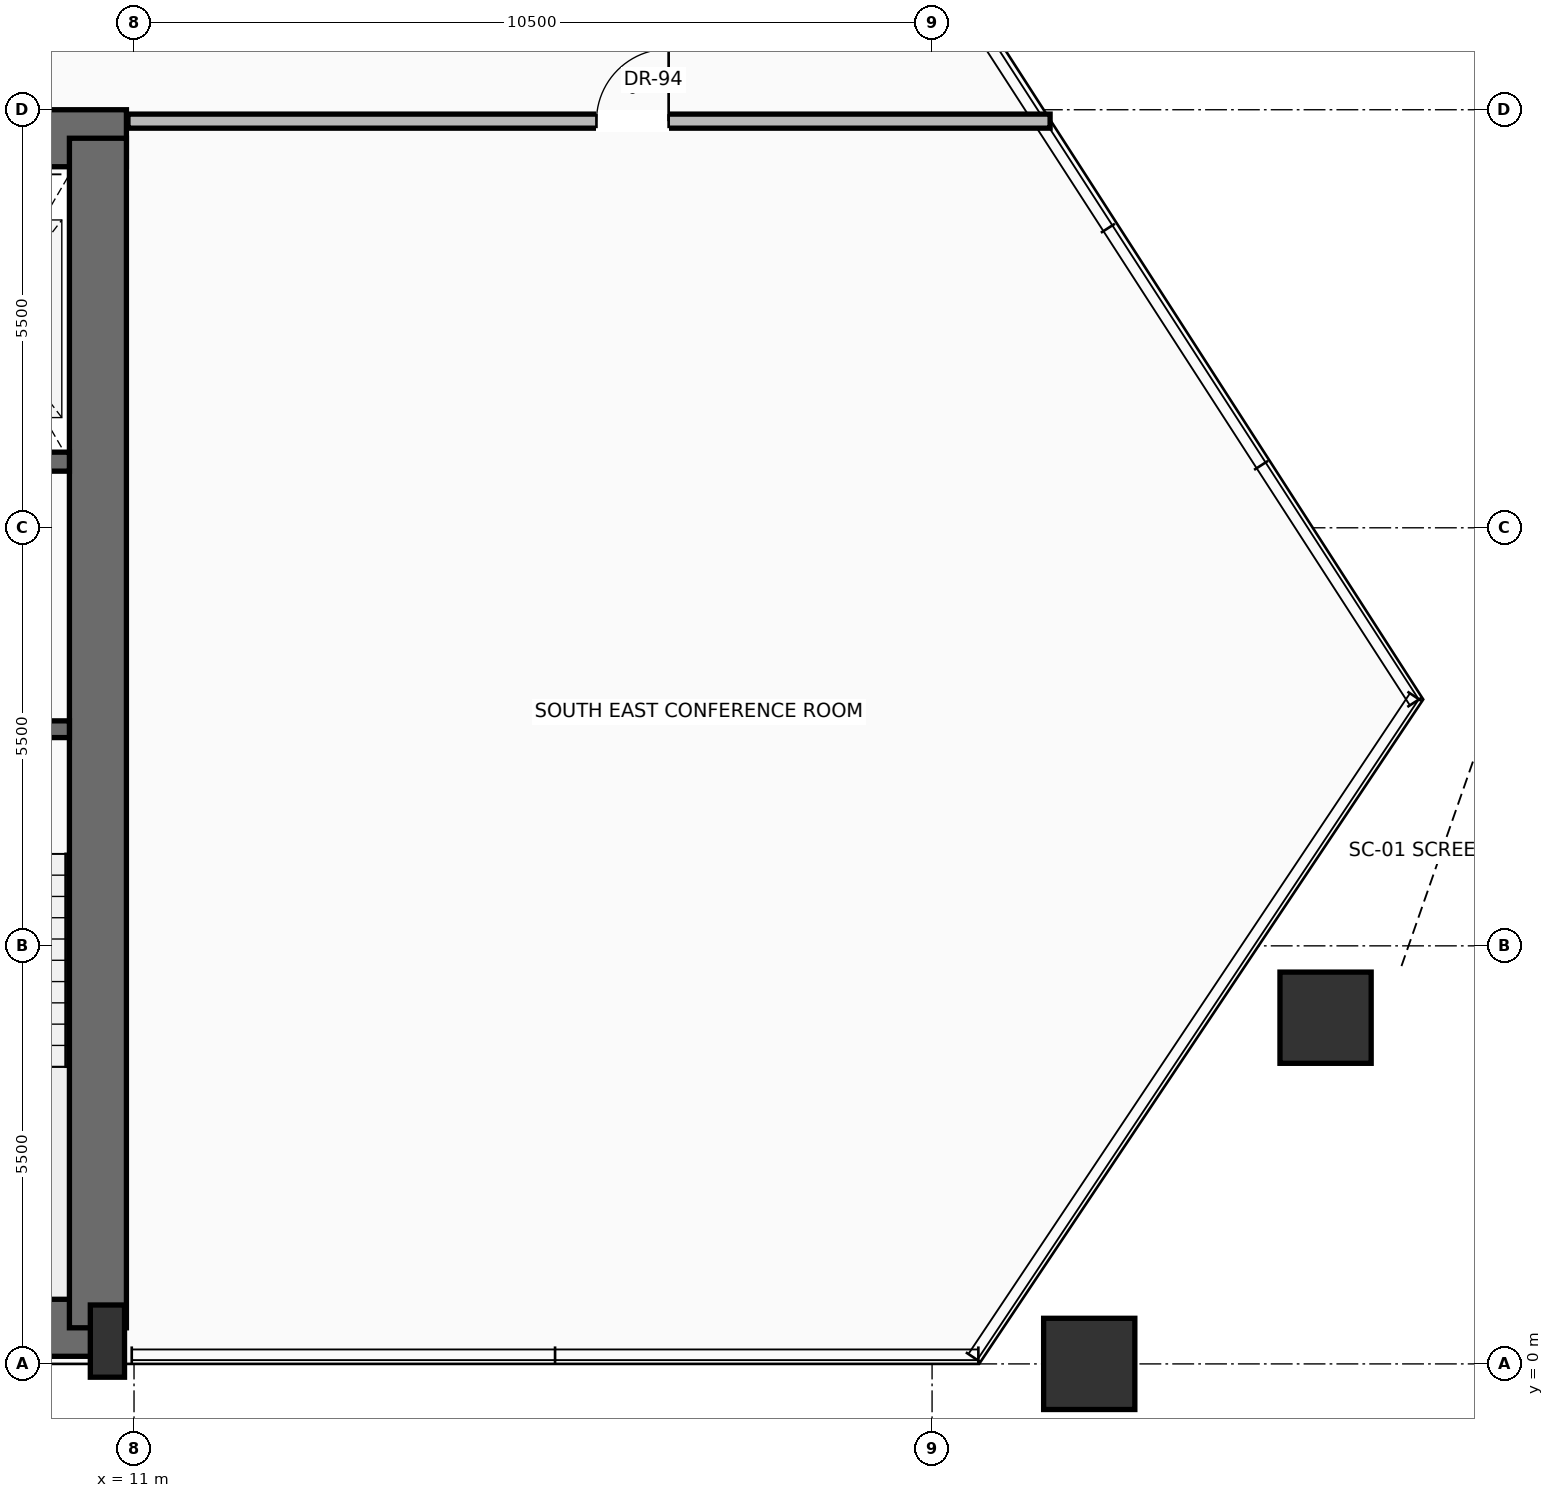
"""IFC4 building model, lengths in metres.
Left out: names, types, materials, properties, quantities, classifications, styles, units other than length and angle.
Written with IfcOpenShell. Run it as: python <this file> out.ifc"""

import sys

from ifc_helpers import new_model, si_unit, direction, frame, frame_2d, origin, origin_2d, place, context, subcontext, project, spatial, rectangle, hollow_rectangle, extrude, source, transform, mapped, element, fill, save


model = new_model("IFC4")
c1 = context("Model", 3, precision=1e-05, world=origin(), true_north=direction((0.0, 1.0)))
c2 = subcontext(c1, "Body", "Model", "MODEL_VIEW")
j1 = project(units=[si_unit("LENGTHUNIT", "METRE"), si_unit("PLANEANGLEUNIT", "RADIAN")], contexts=[c1])
p1 = place(None, origin())
s1 = spatial("IfcSite", under=j1, at=p1, CompositionType="ELEMENT")
p2 = place(p1, origin())
s2 = spatial("IfcBuilding", under=s1, at=p2, CompositionType="ELEMENT")
p3 = place(p2, frame((0.0, 0.0, 106.2)))
s3 = spatial("IfcBuildingStorey", under=s2, at=p3, CompositionType="ELEMENT", Elevation=106.2)
p4 = place(p3, frame((-10.65, 0.475, 0.0), z_axis=(0.0, 0.0, 1.0), x_axis=(1.0, 0.0, 0.0)))
e1 = element("IfcWall", 1, at=p4, inside=s3, PredefinedType="SHEAR", context=c2, shape_type="SweptSolid", body=[
    extrude(rectangle(XDim=21.3, YDim=0.75, at=frame_2d((10.65, 0.0))), origin(), (0.0, 0.0, 1.0), 3.45),
])
p5 = place(p3, frame((-10.9, 16.125, 0.0), z_axis=(0.0, 0.0, 1.0), x_axis=(1.0, 0.0, 0.0)))
e2 = element("IfcWall", 2, at=p5, inside=s3, PredefinedType="SHEAR", context=c2, shape_type="SweptSolid", body=[
    extrude(rectangle(XDim=21.8, YDim=0.75, at=frame_2d((10.9, 0.0))), origin(), (0.0, 0.0, 1.0), 3.45),
])
p6 = place(p5, frame((3.47, 0.0, 0.0)))
e3 = element("IfcOpeningElement", 3, at=p6, cuts=e2, PredefinedType="OPENING", context=c2, shape_type="SweptSolid", body=[
    extrude(rectangle(XDim=1.3, YDim=2.3, at=frame_2d((0.65, 1.15))), frame((0.0, 0.385, 0.0), z_axis=(0.0, -1.0, 0.0), x_axis=(1.0, 0.0, 0.0)), (0.0, 0.0, 1.0), 0.77),
])
p7 = place(p5, frame((9.9, 0.0, 0.0)))
e4 = element("IfcOpeningElement", 4, at=p7, cuts=e2, PredefinedType="OPENING", context=c2, shape_type="SweptSolid", body=[
    extrude(rectangle(XDim=2.0, YDim=2.4, at=frame_2d((1.0, 1.2))), frame((0.0, 0.385, 0.0), z_axis=(0.0, -1.0, 0.0), x_axis=(1.0, 0.0, 0.0)), (0.0, 0.0, 1.0), 0.77),
])
p8 = place(p3, frame((10.525, 0.475, 0.0), z_axis=(0.0, 0.0, 1.0), x_axis=(0.0, 1.0, 0.0)))
e5 = element("IfcWall", 5, at=p8, inside=s3, PredefinedType="SHEAR", context=c2, shape_type="SweptSolid", body=[
    extrude(rectangle(XDim=15.65, YDim=0.75, at=frame_2d((7.825, 0.0))), origin(), (0.0, 0.0, 1.0), 3.45),
])
m1 = source(origin(), c2, "Body", "SweptSolid", [
    extrude(rectangle(XDim=0.45, YDim=0.95, at=origin_2d()), origin(), (0.0, 0.0, 1.0), 3.7),
])
p9 = place(p3, frame((10.65, 0.3, 0.0), z_axis=(0.0, 0.0, 1.0), x_axis=(1.0, 0.0, 0.0)))
e6 = element("IfcColumn", 6, at=p9, inside=s3, PredefinedType="PILASTER", context=c2, shape_type="MappedRepresentation", body=[
    mapped(m1, transform((0.0, 0.0, 0.0), scale=1.0)),
])
m2 = source(origin(), c2, "Body", "SweptSolid", [
    extrude(hollow_rectangle(XDim=1.2, YDim=1.2, WallThickness=0.06, at=origin_2d()), origin(), (0.0, 0.0, 1.0), 3.691),
])
p10 = place(p3, frame((23.568, 0.0, 0.004), z_axis=(0.01124341917, 0.0, 0.999936790765), x_axis=(0.0, 1.0, 0.0)))
e7 = element("IfcColumn", 7, at=p10, inside=s3, PredefinedType="COLUMN", context=c2, shape_type="MappedRepresentation", body=[
    mapped(m2, transform((0.0, 0.0, 0.0), scale=1.0)),
])
m3 = source(origin(), c2, "Body", "SweptSolid", [
    extrude(hollow_rectangle(XDim=1.2, YDim=1.2, WallThickness=0.06, at=origin_2d()), origin(), (0.0, 0.0, 1.0), 3.692),
])
p11 = place(p3, frame((26.677, 4.555, 0.004), z_axis=(-0.001388804445, -0.015872050795, 0.999873066557), x_axis=(0.996193717496, -0.087166950281, 0.0)))
e8 = element("IfcColumn", 8, at=p11, inside=s3, PredefinedType="COLUMN", context=c2, shape_type="MappedRepresentation", body=[
    mapped(m3, transform((0.0, 0.0, 0.0), scale=1.0)),
])
p12 = place(p3, frame((10.15, 8.35, 0.0), z_axis=(0.0, 0.0, 1.0), x_axis=(-1.0, 0.0, 0.0)))
e9 = element("IfcWall", 9, at=p12, inside=s3, PredefinedType="SOLIDWALL", context=c2, shape_type="SweptSolid", body=[
    extrude(rectangle(XDim=4.65, YDim=0.22, at=frame_2d((2.325, 0.0))), origin(), (0.0, 0.0, 1.0), 3.45),
])
p13 = place(p12, frame((1.0, 0.0, 0.0)))
e10 = element("IfcOpeningElement", 10, at=p13, cuts=e9, PredefinedType="OPENING", context=c2, shape_type="SweptSolid", body=[
    extrude(rectangle(XDim=1.15, YDim=2.2, at=frame_2d((0.575, 1.1))), frame((0.0, 0.12, 0.0), z_axis=(0.0, -1.0, 0.0), x_axis=(1.0, 0.0, 0.0)), (0.0, 0.0, 1.0), 0.24),
])
p14 = place(p3, frame((10.15, 11.87, 0.0), z_axis=(0.0, 0.0, 1.0), x_axis=(-1.0, 0.0, 0.0)))
e11 = element("IfcWall", 11, at=p14, inside=s3, PredefinedType="SOLIDWALL", context=c2, shape_type="SweptSolid", body=[
    extrude(rectangle(XDim=4.65, YDim=0.25, at=frame_2d((2.325, 0.0))), origin(), (0.0, 0.0, 1.0), 3.45),
])
p15 = place(p14, frame((0.5, 0.0, 0.0)))
e12 = element("IfcOpeningElement", 12, at=p15, cuts=e11, PredefinedType="OPENING", context=c2, shape_type="SweptSolid", body=[
    extrude(rectangle(XDim=1.2, YDim=2.25, at=frame_2d((0.6, 1.125))), frame((0.0, 0.135, 0.0), z_axis=(0.0, -1.0, 0.0), x_axis=(1.0, 0.0, 0.0)), (0.0, 0.0, 1.0), 0.27),
])
p16 = place(p3, frame((10.92, 16.35, 0.0), z_axis=(0.0, 0.0, 1.0), x_axis=(1.0, 0.0, 0.0)))
e13 = element("IfcWall", 13, at=p16, inside=s3, PredefinedType="PARTITIONING", context=c2, shape_type="SweptSolid", body=[
    extrude(rectangle(XDim=12.133, YDim=0.185, at=frame_2d((6.066, 0.0))), origin(), (0.0, 0.0, 1.0), 2.747),
])
p17 = place(p16, frame((6.164, 0.0, 0.0)))
e14 = element("IfcOpeningElement", 14, at=p17, cuts=e13, PredefinedType="OPENING", context=c2, shape_type="SweptSolid", body=[
    extrude(rectangle(XDim=0.95, YDim=2.2, at=frame_2d((0.475, 1.1))), frame((0.0, 0.103, 0.0), z_axis=(0.0, -1.0, 0.0), x_axis=(1.0, 0.0, 0.0)), (0.0, 0.0, 1.0), 0.205),
])
m4 = source(origin(), c2, "Body", "SweptSolid", [
    extrude(rectangle(XDim=0.95, YDim=2.2, at=frame_2d((0.475, 1.1))), frame((0.0, 0.025, 0.0), z_axis=(0.0, -1.0, 0.0), x_axis=(1.0, 0.0, 0.0)), (0.0, 0.0, 1.0), 0.05),
])
p18 = place(p17, origin())
e15 = element("IfcDoor", 15, at=p18, inside=s3, OperationType="SINGLE_SWING_RIGHT", PredefinedType="DOOR", context=c2, shape_type="MappedRepresentation", body=[
    mapped(m4, transform((0.0, 0.0, 0.0), scale=1.0)),
])
fill(e14, e15)
save(model, sys.argv[1])
